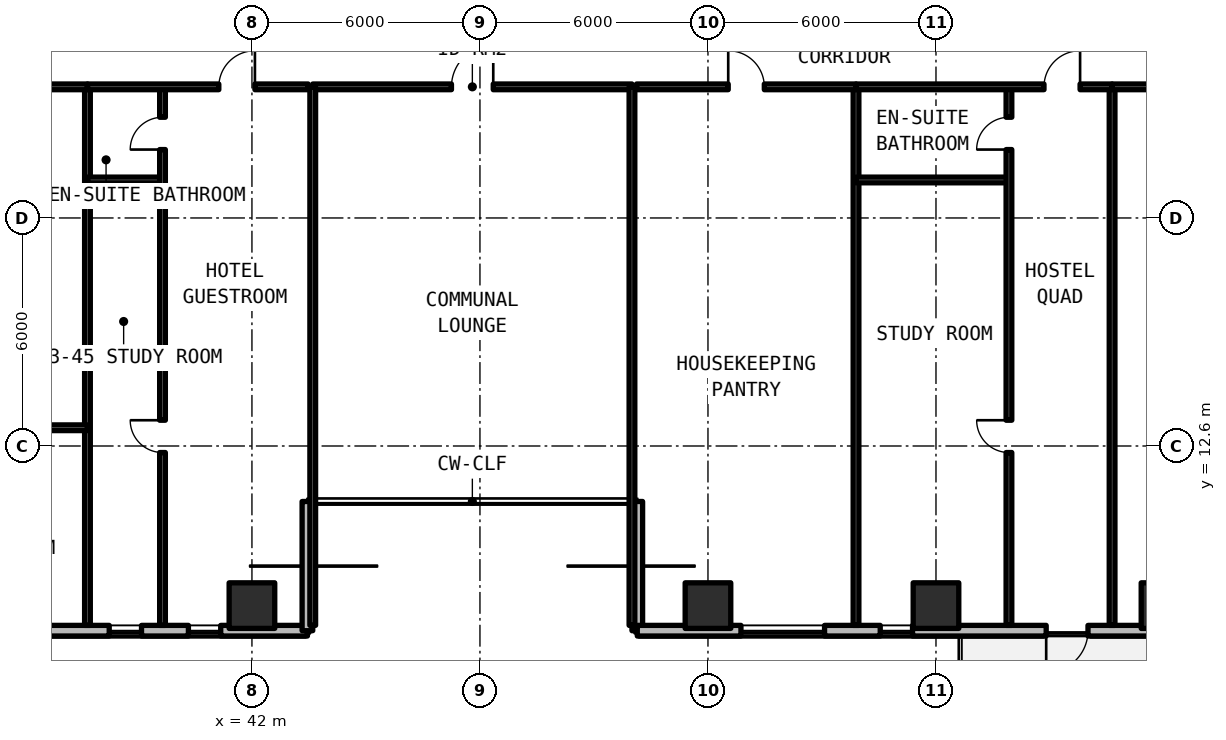
"""IFC4 building model, lengths in metres.
Left out: names, types, materials, properties, quantities, classifications, styles, units other than length and angle.
Written with IfcOpenShell. Run it as: python <this file> out.ifc"""

import sys

from ifc_helpers import new_model, si_unit, direction, frame, frame_2d, origin, origin_2d, place, context, subcontext, project, spatial, rectangle, extrude, element, fill, save


model = new_model("IFC4")
c1 = context("Model", 3, precision=1e-05, world=origin(), true_north=direction((0.0, 1.0)))
c2 = subcontext(c1, "Body", "Model", "MODEL_VIEW")
j1 = project(units=[si_unit("LENGTHUNIT", "METRE"), si_unit("PLANEANGLEUNIT", "RADIAN")], contexts=[c1])
p1 = place(None, origin())
s1 = spatial("IfcSite", under=j1, at=p1, CompositionType="ELEMENT")
p2 = place(p1, origin())
s2 = spatial("IfcBuilding", under=s1, at=p2, CompositionType="ELEMENT")
p3 = place(p2, frame((0.0, 0.0, 48.84)))
s3 = spatial("IfcBuildingStorey", under=s2, at=p3, CompositionType="ELEMENT", Elevation=48.84)
for number, where, z_axis, x_axis in (
    (1, (42.0, 8.4, 0.0), (0.0, 0.0, 1.0), (1.0, 0.0, 0.0)),
    (2, (54.0, 8.4, 0.0), (0.0, 0.0, 1.0), (1.0, 0.0, 0.0)),
    (3, (60.0, 8.4, 0.0), (0.0, 0.0, 1.0), (1.0, 0.0, 0.0)),
    (4, (66.0, 8.4, 0.0), (0.0, 0.0, 1.0), (1.0, 0.0, 0.0)),
):
    element("IfcColumn", number, at=place(p3, frame(where, z_axis=z_axis, x_axis=x_axis)), inside=s3, PredefinedType="COLUMN", context=c2, shape_type="SweptSolid", body=[
        extrude(rectangle(XDim=1.2, YDim=1.2, at=origin_2d()), origin(), (0.0, 0.0, 1.0), 3.3),
    ])
p4 = place(p3, frame((20.858, 7.74, 0.0), z_axis=(0.0, 0.0, 1.0), x_axis=(1.0, 0.0, 0.0)))
e5 = element("IfcWall", 5, at=p4, inside=s3, PredefinedType="SOLIDWALL", context=c2, shape_type="SweptSolid", body=[
    extrude(rectangle(XDim=22.602, YDim=0.28, at=frame_2d((11.301, 0.0))), origin(), (0.0, 0.0, 1.0), 3.08),
])
p5 = place(p4, frame((10.992, 0.0, 0.0)))
e6 = element("IfcOpeningElement", 6, at=p5, cuts=e5, PredefinedType="OPENING", context=c2, shape_type="SweptSolid", body=[
    extrude(rectangle(XDim=1.1, YDim=2.15, at=frame_2d((0.55, 1.075))), frame((0.0, 0.15, 0.0), z_axis=(0.0, -1.0, 0.0), x_axis=(1.0, 0.0, 0.0)), (0.0, 0.0, 1.0), 0.3),
])
p6 = place(p4, frame((3.925, 0.0, 0.78)))
e7 = element("IfcOpeningElement", 7, at=p6, cuts=e5, PredefinedType="OPENING", context=c2, shape_type="SweptSolid", body=[
    extrude(rectangle(XDim=2.2, YDim=1.66, at=frame_2d((1.1, 0.83))), frame((0.0, 0.15, 0.0), z_axis=(0.0, -1.0, 0.0), x_axis=(1.0, 0.0, 0.0)), (0.0, 0.0, 1.0), 0.3),
])
p7 = place(p4, frame((13.493, 0.0, 0.78)))
e8 = element("IfcOpeningElement", 8, at=p7, cuts=e5, PredefinedType="OPENING", context=c2, shape_type="SweptSolid", body=[
    extrude(rectangle(XDim=0.85, YDim=1.65, at=frame_2d((0.425, 0.825))), frame((0.0, 0.15, 0.0), z_axis=(0.0, -1.0, 0.0), x_axis=(1.0, 0.0, 0.0)), (0.0, 0.0, 1.0), 0.3),
])
p8 = place(p4, frame((17.386, 0.0, 0.78)))
e9 = element("IfcOpeningElement", 9, at=p8, cuts=e5, PredefinedType="OPENING", context=c2, shape_type="SweptSolid", body=[
    extrude(rectangle(XDim=0.85, YDim=1.65, at=frame_2d((0.425, 0.825))), frame((0.0, 0.15, 0.0), z_axis=(0.0, -1.0, 0.0), x_axis=(1.0, 0.0, 0.0)), (0.0, 0.0, 1.0), 0.3),
])
p9 = place(p4, frame((19.47, 0.0, 0.78)))
e10 = element("IfcOpeningElement", 10, at=p9, cuts=e5, PredefinedType="OPENING", context=c2, shape_type="SweptSolid", body=[
    extrude(rectangle(XDim=0.85, YDim=1.65, at=frame_2d((0.425, 0.825))), frame((0.0, 0.15, 0.0), z_axis=(0.0, -1.0, 0.0), x_axis=(1.0, 0.0, 0.0)), (0.0, 0.0, 1.0), 0.3),
])
for number, where, z_axis, x_axis in (
    (11, (43.46, 7.74, 0.0), (0.0, 0.0, 1.0), (0.0, 1.0, 0.0)),
    (12, (52.14, 11.14, 0.0), (0.0, 0.0, 1.0), (0.0, -1.0, 0.0)),
):
    element("IfcWall", number, at=place(p3, frame(where, z_axis=z_axis, x_axis=x_axis)), inside=s3, PredefinedType="SOLIDWALL", context=c2, shape_type="SweptSolid", body=[
        extrude(rectangle(XDim=3.4, YDim=0.28, at=frame_2d((1.7, 0.0))), origin(), (0.0, 0.0, 1.0), 3.08),
    ])
p10 = place(p3, frame((52.14, 7.74, 0.0), z_axis=(0.0, 0.0, 1.0), x_axis=(1.0, 0.0, 0.0)))
e13 = element("IfcWall", 13, at=p10, inside=s3, PredefinedType="SOLIDWALL", context=c2, shape_type="SweptSolid", body=[
    extrude(rectangle(XDim=44.402, YDim=0.28, at=frame_2d((22.201, 0.0))), origin(), (0.0, 0.0, 1.0), 3.08),
])
p11 = place(p10, frame((10.76, 0.0, 0.0)))
e14 = element("IfcOpeningElement", 14, at=p11, cuts=e13, PredefinedType="OPENING", context=c2, shape_type="SweptSolid", body=[
    extrude(rectangle(XDim=1.1, YDim=2.15, at=frame_2d((0.55, 1.075))), frame((0.0, 0.15, 0.0), z_axis=(0.0, -1.0, 0.0), x_axis=(1.0, 0.0, 0.0)), (0.0, 0.0, 1.0), 0.3),
])
p12 = place(p10, frame((22.86, 0.0, 0.0)))
e15 = element("IfcOpeningElement", 15, at=p12, cuts=e13, PredefinedType="OPENING", context=c2, shape_type="SweptSolid", body=[
    extrude(rectangle(XDim=1.1, YDim=2.15, at=frame_2d((0.55, 1.075))), frame((0.0, 0.15, 0.0), z_axis=(0.0, -1.0, 0.0), x_axis=(1.0, 0.0, 0.0)), (0.0, 0.0, 1.0), 0.3),
])
p13 = place(p10, frame((34.96, 0.0, 0.0)))
e16 = element("IfcOpeningElement", 16, at=p13, cuts=e13, PredefinedType="OPENING", context=c2, shape_type="SweptSolid", body=[
    extrude(rectangle(XDim=1.1, YDim=2.15, at=frame_2d((0.55, 1.075))), frame((0.0, 0.15, 0.0), z_axis=(0.0, -1.0, 0.0), x_axis=(1.0, 0.0, 0.0)), (0.0, 0.0, 1.0), 0.3),
])
p14 = place(p10, frame((2.728, 0.0, 0.78)))
e17 = element("IfcOpeningElement", 17, at=p14, cuts=e13, PredefinedType="OPENING", context=c2, shape_type="SweptSolid", body=[
    extrude(rectangle(XDim=2.2, YDim=1.66, at=frame_2d((1.1, 0.83))), frame((0.0, 0.15, 0.0), z_axis=(0.0, -1.0, 0.0), x_axis=(1.0, 0.0, 0.0)), (0.0, 0.0, 1.0), 0.3),
])
p15 = place(p10, frame((6.393, 0.0, 0.78)))
e18 = element("IfcOpeningElement", 18, at=p15, cuts=e13, PredefinedType="OPENING", context=c2, shape_type="SweptSolid", body=[
    extrude(rectangle(XDim=0.85, YDim=1.65, at=frame_2d((0.425, 0.825))), frame((0.0, 0.15, 0.0), z_axis=(0.0, -1.0, 0.0), x_axis=(1.0, 0.0, 0.0)), (0.0, 0.0, 1.0), 0.3),
])
p16 = place(p10, frame((15.726, 0.0, 0.78)))
e19 = element("IfcOpeningElement", 19, at=p16, cuts=e13, PredefinedType="OPENING", context=c2, shape_type="SweptSolid", body=[
    extrude(rectangle(XDim=2.2, YDim=1.66, at=frame_2d((1.1, 0.83))), frame((0.0, 0.15, 0.0), z_axis=(0.0, -1.0, 0.0), x_axis=(1.0, 0.0, 0.0)), (0.0, 0.0, 1.0), 0.3),
])
p17 = place(p10, frame((28.873, 0.0, 0.78)))
e20 = element("IfcOpeningElement", 20, at=p17, cuts=e13, PredefinedType="OPENING", context=c2, shape_type="SweptSolid", body=[
    extrude(rectangle(XDim=2.2, YDim=1.66, at=frame_2d((1.1, 0.83))), frame((0.0, 0.15, 0.0), z_axis=(0.0, -1.0, 0.0), x_axis=(1.0, 0.0, 0.0)), (0.0, 0.0, 1.0), 0.3),
])
p18 = place(p10, frame((38.612, 0.0, 0.78)))
e21 = element("IfcOpeningElement", 21, at=p18, cuts=e13, PredefinedType="OPENING", context=c2, shape_type="SweptSolid", body=[
    extrude(rectangle(XDim=0.85, YDim=1.65, at=frame_2d((0.425, 0.825))), frame((0.0, 0.15, 0.0), z_axis=(0.0, -1.0, 0.0), x_axis=(1.0, 0.0, 0.0)), (0.0, 0.0, 1.0), 0.3),
])
p19 = place(p10, frame((41.006, 0.0, 0.78)))
e22 = element("IfcOpeningElement", 22, at=p19, cuts=e13, PredefinedType="OPENING", context=c2, shape_type="SweptSolid", body=[
    extrude(rectangle(XDim=2.2, YDim=1.66, at=frame_2d((1.1, 0.83))), frame((0.0, 0.15, 0.0), z_axis=(0.0, -1.0, 0.0), x_axis=(1.0, 0.0, 0.0)), (0.0, 0.0, 1.0), 0.3),
])
p20 = place(p3, frame((43.6, 22.05, 0.0), z_axis=(0.0, 0.0, 1.0), x_axis=(1.0, 0.0, 0.0)))
e23 = element("IfcWall", 23, at=p20, inside=s3, PredefinedType="SOLIDWALL", context=c2, shape_type="SweptSolid", body=[
    extrude(rectangle(XDim=8.4, YDim=0.15, at=frame_2d((4.2, 0.0))), origin(), (0.0, 0.0, 1.0), 2.35),
])
p21 = place(p20, frame((3.65, 0.0, 0.0)))
e24 = element("IfcOpeningElement", 24, at=p21, cuts=e23, PredefinedType="OPENING", context=c2, shape_type="SweptSolid", body=[
    extrude(rectangle(XDim=1.1, YDim=2.15, at=frame_2d((0.55, 1.075))), frame((0.0, 0.085, 0.0), z_axis=(0.0, -1.0, 0.0), x_axis=(1.0, 0.0, 0.0)), (0.0, 0.0, 1.0), 0.17),
])
for number, where, z_axis, x_axis in (
    (25, (43.6, 7.88, 0.0), (0.0, 0.0, 1.0), (0.0, 1.0, 0.0)),
    (26, (52.0, 7.88, 0.0), (0.0, 0.0, 1.0), (0.0, 1.0, 0.0)),
    (27, (37.672, 7.88, 0.0), (0.0, 0.0, 1.0), (0.0, 1.0, 0.0)),
):
    element("IfcWall", number, at=place(p3, frame(where, z_axis=z_axis, x_axis=x_axis)), inside=s3, PredefinedType="SOLIDWALL", context=c2, shape_type="SweptSolid", body=[
        extrude(rectangle(XDim=14.17, YDim=0.15, at=frame_2d((7.085, 0.0))), origin(), (0.0, 0.0, 1.0), 2.35),
    ])
p22 = place(p3, frame((28.207, 13.08, 0.0), z_axis=(0.0, 0.0, 1.0), x_axis=(1.0, 0.0, 0.0)))
e28 = element("IfcWall", 28, at=p22, inside=s3, PredefinedType="PARTITIONING", context=c2, shape_type="SweptSolid", body=[
    extrude(rectangle(XDim=9.465, YDim=0.15, at=frame_2d((4.733, 0.0))), origin(), (0.0, 0.0, 1.0), 2.35),
])
p23 = place(p22, frame((4.239, 0.0, 0.0)))
e29 = element("IfcOpeningElement", 29, at=p23, cuts=e28, PredefinedType="OPENING", context=c2, shape_type="SweptSolid", body=[
    extrude(rectangle(XDim=0.85, YDim=2.1, at=frame_2d((0.425, 1.05))), frame((0.0, 0.085, 0.0), z_axis=(0.0, -1.0, 0.0), x_axis=(1.0, 0.0, 0.0)), (0.0, 0.0, 1.0), 0.17),
])
p24 = place(p22, frame((7.115, 0.0, 0.0)))
e30 = element("IfcOpeningElement", 30, at=p24, cuts=e28, PredefinedType="OPENING", context=c2, shape_type="SweptSolid", body=[
    extrude(rectangle(XDim=0.85, YDim=2.1, at=frame_2d((0.425, 1.05))), frame((0.0, 0.085, 0.0), z_axis=(0.0, -1.0, 0.0), x_axis=(1.0, 0.0, 0.0)), (0.0, 0.0, 1.0), 0.17),
])
p25 = place(p3, frame((28.207, 22.05, 0.0), z_axis=(0.0, 0.0, 1.0), x_axis=(1.0, 0.0, 0.0)))
e31 = element("IfcWall", 31, at=p25, inside=s3, PredefinedType="SOLIDWALL", context=c2, shape_type="SweptSolid", body=[
    extrude(rectangle(XDim=9.465, YDim=0.15, at=frame_2d((4.733, 0.0))), origin(), (0.0, 0.0, 1.0), 2.35),
])
p26 = place(p25, frame((6.154, 0.0, 0.0)))
e32 = element("IfcOpeningElement", 32, at=p26, cuts=e31, PredefinedType="OPENING", context=c2, shape_type="SweptSolid", body=[
    extrude(rectangle(XDim=0.95, YDim=2.15, at=frame_2d((0.475, 1.075))), frame((0.0, 0.085, 0.0), z_axis=(0.0, -1.0, 0.0), x_axis=(1.0, 0.0, 0.0)), (0.0, 0.0, 1.0), 0.17),
])
p27 = place(p3, frame((37.672, 19.6, 0.0), z_axis=(0.0, 0.0, 1.0), x_axis=(1.0, 0.0, 0.0)))
e33 = element("IfcWall", 33, at=p27, inside=s3, PredefinedType="PARTITIONING", context=c2, shape_type="SweptSolid", body=[
    extrude(rectangle(XDim=1.975, YDim=0.15, at=frame_2d((0.987, 0.0))), origin(), (0.0, 0.0, 1.0), 2.35),
])
p28 = place(p3, frame((39.646, 7.88, 0.0), z_axis=(0.0, 0.0, 1.0), x_axis=(0.0, 1.0, 0.0)))
e34 = element("IfcWall", 34, at=p28, inside=s3, PredefinedType="PARTITIONING", context=c2, shape_type="SweptSolid", body=[
    extrude(rectangle(XDim=14.17, YDim=0.15, at=frame_2d((7.085, 0.0))), origin(), (0.0, 0.0, 1.0), 2.35),
])
p29 = place(p28, frame((4.548, 0.0, 0.0)))
e35 = element("IfcOpeningElement", 35, at=p29, cuts=e34, PredefinedType="OPENING", context=c2, shape_type="SweptSolid", body=[
    extrude(rectangle(XDim=0.85, YDim=2.1, at=frame_2d((0.425, 1.05))), frame((0.0, 0.085, 0.0), z_axis=(0.0, -1.0, 0.0), x_axis=(1.0, 0.0, 0.0)), (0.0, 0.0, 1.0), 0.17),
])
p30 = place(p28, frame((12.52, 0.0, 0.0)))
e36 = element("IfcOpeningElement", 36, at=p30, cuts=e34, PredefinedType="OPENING", context=c2, shape_type="SweptSolid", body=[
    extrude(rectangle(XDim=0.85, YDim=2.1, at=frame_2d((0.425, 1.05))), frame((0.0, 0.085, 0.0), z_axis=(0.0, -1.0, 0.0), x_axis=(1.0, 0.0, 0.0)), (0.0, 0.0, 1.0), 0.17),
])
p31 = place(p3, frame((37.672, 22.05, 0.0), z_axis=(0.0, 0.0, 1.0), x_axis=(1.0, 0.0, 0.0)))
e37 = element("IfcWall", 37, at=p31, inside=s3, PredefinedType="SOLIDWALL", context=c2, shape_type="SweptSolid", body=[
    extrude(rectangle(XDim=5.808, YDim=0.15, at=frame_2d((2.904, 0.0))), origin(), (0.0, 0.0, 1.0), 2.35),
])
p32 = place(p31, frame((3.457, 0.0, 0.0)))
e38 = element("IfcOpeningElement", 38, at=p32, cuts=e37, PredefinedType="OPENING", context=c2, shape_type="SweptSolid", body=[
    extrude(rectangle(XDim=0.95, YDim=2.15, at=frame_2d((0.475, 1.075))), frame((0.0, 0.085, 0.0), z_axis=(0.0, -1.0, 0.0), x_axis=(1.0, 0.0, 0.0)), (0.0, 0.0, 1.0), 0.17),
])
p33 = place(p3, frame((57.896, 7.88, 0.0), z_axis=(0.0, 0.0, 1.0), x_axis=(0.0, 1.0, 0.0)))
e39 = element("IfcWall", 39, at=p33, inside=s3, PredefinedType="SOLIDWALL", context=c2, shape_type="SweptSolid", body=[
    extrude(rectangle(XDim=14.17, YDim=0.15, at=frame_2d((7.085, 0.0))), origin(), (0.0, 0.0, 1.0), 2.35),
])
p34 = place(p3, frame((52.12, 22.05, 0.0), z_axis=(0.0, 0.0, 1.0), x_axis=(1.0, 0.0, 0.0)))
e40 = element("IfcWall", 40, at=p34, inside=s3, PredefinedType="SOLIDWALL", context=c2, shape_type="SweptSolid", body=[
    extrude(rectangle(XDim=5.776, YDim=0.15, at=frame_2d((2.888, 0.0))), origin(), (0.0, 0.0, 1.0), 2.35),
])
p35 = place(p34, frame((2.413, 0.0, 0.0)))
e41 = element("IfcOpeningElement", 41, at=p35, cuts=e40, PredefinedType="OPENING", context=c2, shape_type="SweptSolid", body=[
    extrude(rectangle(XDim=0.95, YDim=2.15, at=frame_2d((0.475, 1.075))), frame((0.0, 0.085, 0.0), z_axis=(0.0, -1.0, 0.0), x_axis=(1.0, 0.0, 0.0)), (0.0, 0.0, 1.0), 0.17),
])
p36 = place(p3, frame((64.634, 7.88, 0.0), z_axis=(0.0, 0.0, 1.0), x_axis=(0.0, 1.0, 0.0)))
e42 = element("IfcWall", 42, at=p36, inside=s3, PredefinedType="SOLIDWALL", context=c2, shape_type="SweptSolid", body=[
    extrude(rectangle(XDim=14.17, YDim=0.15, at=frame_2d((7.085, 0.0))), origin(), (0.0, 0.0, 1.0), 2.35),
])
p37 = place(p3, frame((57.896, 19.6, 0.0), z_axis=(0.0, 0.0, 1.0), x_axis=(1.0, 0.0, 0.0)))
e43 = element("IfcWall", 43, at=p37, inside=s3, PredefinedType="PARTITIONING", context=c2, shape_type="SweptSolid", body=[
    extrude(rectangle(XDim=4.024, YDim=0.15, at=frame_2d((2.012, 0.0))), origin(), (0.0, 0.0, 1.0), 2.35),
])
p38 = place(p3, frame((61.92, 7.88, 0.0), z_axis=(0.0, 0.0, 1.0), x_axis=(0.0, 1.0, 0.0)))
e44 = element("IfcWall", 44, at=p38, inside=s3, PredefinedType="PARTITIONING", context=c2, shape_type="SweptSolid", body=[
    extrude(rectangle(XDim=14.17, YDim=0.15, at=frame_2d((7.085, 0.0))), origin(), (0.0, 0.0, 1.0), 2.35),
])
p39 = place(p38, frame((4.548, 0.0, 0.0)))
e45 = element("IfcOpeningElement", 45, at=p39, cuts=e44, PredefinedType="OPENING", context=c2, shape_type="SweptSolid", body=[
    extrude(rectangle(XDim=0.85, YDim=2.1, at=frame_2d((0.425, 1.05))), frame((0.0, 0.085, 0.0), z_axis=(0.0, -1.0, 0.0), x_axis=(1.0, 0.0, 0.0)), (0.0, 0.0, 1.0), 0.17),
])
p40 = place(p38, frame((12.52, 0.0, 0.0)))
e46 = element("IfcOpeningElement", 46, at=p40, cuts=e44, PredefinedType="OPENING", context=c2, shape_type="SweptSolid", body=[
    extrude(rectangle(XDim=0.85, YDim=2.1, at=frame_2d((0.425, 1.05))), frame((0.0, 0.085, 0.0), z_axis=(0.0, -1.0, 0.0), x_axis=(1.0, 0.0, 0.0)), (0.0, 0.0, 1.0), 0.17),
])
p41 = place(p3, frame((57.896, 22.05, 0.0), z_axis=(0.0, 0.0, 1.0), x_axis=(1.0, 0.0, 0.0)))
e47 = element("IfcWall", 47, at=p41, inside=s3, PredefinedType="SOLIDWALL", context=c2, shape_type="SweptSolid", body=[
    extrude(rectangle(XDim=6.738, YDim=0.15, at=frame_2d((3.369, 0.0))), origin(), (0.0, 0.0, 1.0), 2.35),
])
p42 = place(p41, frame((4.946, 0.0, 0.0)))
e48 = element("IfcOpeningElement", 48, at=p42, cuts=e47, PredefinedType="OPENING", context=c2, shape_type="SweptSolid", body=[
    extrude(rectangle(XDim=0.95, YDim=2.15, at=frame_2d((0.475, 1.075))), frame((0.0, 0.085, 0.0), z_axis=(0.0, -1.0, 0.0), x_axis=(1.0, 0.0, 0.0)), (0.0, 0.0, 1.0), 0.17),
])
p43 = place(p3, frame((64.634, 22.05, 0.0), z_axis=(0.0, 0.0, 1.0), x_axis=(1.0, 0.0, 0.0)))
e49 = element("IfcWall", 49, at=p43, inside=s3, PredefinedType="SOLIDWALL", context=c2, shape_type="SweptSolid", body=[
    extrude(rectangle(XDim=8.664, YDim=0.15, at=frame_2d((4.332, 0.0))), origin(), (0.0, 0.0, 1.0), 2.35),
])
p44 = place(p43, frame((3.782, 0.0, 0.0)))
e50 = element("IfcOpeningElement", 50, at=p44, cuts=e49, PredefinedType="OPENING", context=c2, shape_type="SweptSolid", body=[
    extrude(rectangle(XDim=1.1, YDim=2.15, at=frame_2d((0.55, 1.075))), frame((0.0, 0.085, 0.0), z_axis=(0.0, -1.0, 0.0), x_axis=(1.0, 0.0, 0.0)), (0.0, 0.0, 1.0), 0.17),
])
p45 = place(p8, origin())
e51 = element("IfcWindow", 51, at=p45, inside=s3, PartitioningType="SINGLE_PANEL", PredefinedType="WINDOW", context=c2, shape_type="SweptSolid", body=[
    extrude(rectangle(XDim=0.85, YDim=1.65, at=frame_2d((0.425, 0.825))), frame((0.0, 0.03, 0.0), z_axis=(0.0, -1.0, 0.0), x_axis=(1.0, 0.0, 0.0)), (0.0, 0.0, 1.0), 0.06),
])
fill(e9, e51)
p46 = place(p9, origin())
e52 = element("IfcWindow", 52, at=p46, inside=s3, PartitioningType="SINGLE_PANEL", PredefinedType="WINDOW", context=c2, shape_type="SweptSolid", body=[
    extrude(rectangle(XDim=0.85, YDim=1.65, at=frame_2d((0.425, 0.825))), frame((0.0, 0.03, 0.0), z_axis=(0.0, -1.0, 0.0), x_axis=(1.0, 0.0, 0.0)), (0.0, 0.0, 1.0), 0.06),
])
fill(e10, e52)
p47 = place(p11, frame((1.1, 0.0, 0.0), z_axis=(0.0, 0.0, 1.0), x_axis=(-1.0, 0.0, 0.0)))
e53 = element("IfcDoor", 53, at=p47, inside=s3, OperationType="SINGLE_SWING_LEFT", PredefinedType="DOOR", context=c2, shape_type="SweptSolid", body=[
    extrude(rectangle(XDim=1.1, YDim=2.15, at=frame_2d((0.55, 1.075))), frame((0.0, 0.025, 0.0), z_axis=(0.0, -1.0, 0.0), x_axis=(1.0, 0.0, 0.0)), (0.0, 0.0, 1.0), 0.05),
])
fill(e14, e53)
p48 = place(p14, origin())
e54 = element("IfcWindow", 54, at=p48, inside=s3, PartitioningType="SINGLE_PANEL", PredefinedType="WINDOW", context=c2, shape_type="SweptSolid", body=[
    extrude(rectangle(XDim=2.2, YDim=1.66, at=frame_2d((1.1, 0.83))), frame((0.0, 0.03, 0.0), z_axis=(0.0, -1.0, 0.0), x_axis=(1.0, 0.0, 0.0)), (0.0, 0.0, 1.0), 0.06),
])
fill(e17, e54)
p49 = place(p15, origin())
e55 = element("IfcWindow", 55, at=p49, inside=s3, PartitioningType="SINGLE_PANEL", PredefinedType="WINDOW", context=c2, shape_type="SweptSolid", body=[
    extrude(rectangle(XDim=0.85, YDim=1.65, at=frame_2d((0.425, 0.825))), frame((0.0, 0.03, 0.0), z_axis=(0.0, -1.0, 0.0), x_axis=(1.0, 0.0, 0.0)), (0.0, 0.0, 1.0), 0.06),
])
fill(e18, e55)
p50 = place(p21, origin())
e56 = element("IfcDoor", 56, at=p50, inside=s3, OperationType="SINGLE_SWING_RIGHT", PredefinedType="DOOR", context=c2, shape_type="SweptSolid", body=[
    extrude(rectangle(XDim=1.1, YDim=2.15, at=frame_2d((0.55, 1.075))), frame((0.0, 0.025, 0.0), z_axis=(0.0, -1.0, 0.0), x_axis=(1.0, 0.0, 0.0)), (0.0, 0.0, 1.0), 0.05),
])
fill(e24, e56)
p51 = place(p29, origin())
e57 = element("IfcDoor", 57, at=p51, inside=s3, OperationType="SINGLE_SWING_RIGHT", PredefinedType="DOOR", context=c2, shape_type="SweptSolid", body=[
    extrude(rectangle(XDim=0.85, YDim=2.1, at=frame_2d((0.425, 1.05))), frame((0.0, 0.025, 0.0), z_axis=(0.0, -1.0, 0.0), x_axis=(1.0, 0.0, 0.0)), (0.0, 0.0, 1.0), 0.05),
])
fill(e35, e57)
p52 = place(p30, origin())
e58 = element("IfcDoor", 58, at=p52, inside=s3, OperationType="SINGLE_SWING_LEFT", PredefinedType="DOOR", context=c2, shape_type="SweptSolid", body=[
    extrude(rectangle(XDim=0.85, YDim=2.1, at=frame_2d((0.425, 1.05))), frame((0.0, 0.025, 0.0), z_axis=(0.0, -1.0, 0.0), x_axis=(1.0, 0.0, 0.0)), (0.0, 0.0, 1.0), 0.05),
])
fill(e36, e58)
p53 = place(p32, origin())
e59 = element("IfcDoor", 59, at=p53, inside=s3, OperationType="SINGLE_SWING_RIGHT", PredefinedType="DOOR", context=c2, shape_type="SweptSolid", body=[
    extrude(rectangle(XDim=0.95, YDim=2.15, at=frame_2d((0.475, 1.075))), frame((0.0, 0.025, 0.0), z_axis=(0.0, -1.0, 0.0), x_axis=(1.0, 0.0, 0.0)), (0.0, 0.0, 1.0), 0.05),
])
fill(e38, e59)
p54 = place(p35, origin())
e60 = element("IfcDoor", 60, at=p54, inside=s3, OperationType="SINGLE_SWING_LEFT", PredefinedType="DOOR", context=c2, shape_type="SweptSolid", body=[
    extrude(rectangle(XDim=0.95, YDim=2.15, at=frame_2d((0.475, 1.075))), frame((0.0, 0.025, 0.0), z_axis=(0.0, -1.0, 0.0), x_axis=(1.0, 0.0, 0.0)), (0.0, 0.0, 1.0), 0.05),
])
fill(e41, e60)
p55 = place(p39, origin())
e61 = element("IfcDoor", 61, at=p55, inside=s3, OperationType="SINGLE_SWING_RIGHT", PredefinedType="DOOR", context=c2, shape_type="SweptSolid", body=[
    extrude(rectangle(XDim=0.85, YDim=2.1, at=frame_2d((0.425, 1.05))), frame((0.0, 0.025, 0.0), z_axis=(0.0, -1.0, 0.0), x_axis=(1.0, 0.0, 0.0)), (0.0, 0.0, 1.0), 0.05),
])
fill(e45, e61)
p56 = place(p40, origin())
e62 = element("IfcDoor", 62, at=p56, inside=s3, OperationType="SINGLE_SWING_LEFT", PredefinedType="DOOR", context=c2, shape_type="SweptSolid", body=[
    extrude(rectangle(XDim=0.85, YDim=2.1, at=frame_2d((0.425, 1.05))), frame((0.0, 0.025, 0.0), z_axis=(0.0, -1.0, 0.0), x_axis=(1.0, 0.0, 0.0)), (0.0, 0.0, 1.0), 0.05),
])
fill(e46, e62)
p57 = place(p42, origin())
e63 = element("IfcDoor", 63, at=p57, inside=s3, OperationType="SINGLE_SWING_RIGHT", PredefinedType="DOOR", context=c2, shape_type="SweptSolid", body=[
    extrude(rectangle(XDim=0.95, YDim=2.15, at=frame_2d((0.475, 1.075))), frame((0.0, 0.025, 0.0), z_axis=(0.0, -1.0, 0.0), x_axis=(1.0, 0.0, 0.0)), (0.0, 0.0, 1.0), 0.05),
])
fill(e48, e63)
save(model, sys.argv[1])
